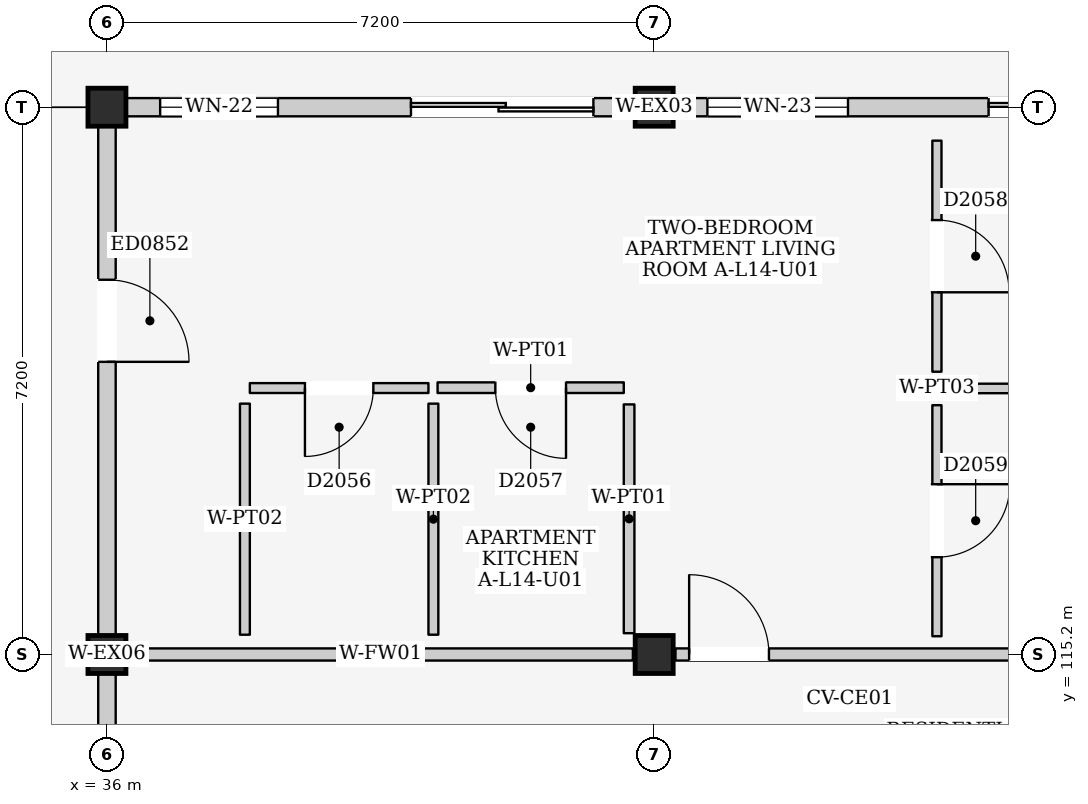
"""IFC4 building model, lengths in metres.
Left out: names, types, materials, properties, quantities, classifications, styles, units other than length and angle.
Written with IfcOpenShell. Run it as: python <this file> out.ifc"""

import sys

from ifc_helpers import new_model, si_unit, direction, frame, frame_2d, origin, origin_2d, place, context, subcontext, project, spatial, rectangle, extrude, element, fill, save


model = new_model("IFC4")
c1 = context("Model", 3, precision=1e-05, world=origin(), true_north=direction((0.0, 1.0)))
c2 = subcontext(c1, "Body", "Model", "MODEL_VIEW")
j1 = project(units=[si_unit("LENGTHUNIT", "METRE"), si_unit("PLANEANGLEUNIT", "RADIAN")], contexts=[c1])
p1 = place(None, origin())
s1 = spatial("IfcSite", under=j1, at=p1, CompositionType="ELEMENT")
p2 = place(p1, origin())
s2 = spatial("IfcBuilding", under=s1, at=p2, CompositionType="ELEMENT")
p3 = place(p2, frame((0.0, 0.0, 47.7)))
s3 = spatial("IfcBuildingStorey", under=s2, at=p3, CompositionType="ELEMENT", Elevation=47.7)
for number, where, z_axis, x_axis in (
    (1, (36.0, 115.2, 0.0), (0.0, 0.0, 1.0), (1.0, 0.0, 0.0)),
    (2, (36.0, 122.4, 0.0), (0.0, 0.0, 1.0), (1.0, 0.0, 0.0)),
    (3, (43.2, 115.2, 0.0), (0.0, 0.0, 1.0), (1.0, 0.0, 0.0)),
    (4, (43.2, 122.4, 0.0), (0.0, 0.0, 1.0), (1.0, 0.0, 0.0)),
):
    element("IfcColumn", number, at=place(p3, frame(where, z_axis=z_axis, x_axis=x_axis)), inside=s3, PredefinedType="COLUMN", context=c2, shape_type="SweptSolid", body=[
        extrude(rectangle(XDim=0.5, YDim=0.5, at=origin_2d()), origin(), (0.0, 0.0, 1.0), 3.2),
    ])
p4 = place(p3, frame((36.25, 122.4, 0.0), z_axis=(0.0, 0.0, 1.0), x_axis=(1.0, 0.0, 0.0)))
e5 = element("IfcWall", 5, at=p4, inside=s3, PredefinedType="ELEMENTEDWALL", context=c2, shape_type="SweptSolid", body=[
    extrude(rectangle(XDim=6.7, YDim=0.24, at=frame_2d((3.35, 0.0))), origin(), (0.0, 0.0, 1.0), 2.535),
])
p5 = place(p4, frame((3.75, 0.0, 0.0)))
e6 = element("IfcOpeningElement", 6, at=p5, cuts=e5, PredefinedType="OPENING", context=c2, shape_type="SweptSolid", body=[
    extrude(rectangle(XDim=2.4, YDim=2.12, at=frame_2d((1.2, 1.06))), frame((0.0, 0.135, 0.0), z_axis=(0.0, -1.0, 0.0), x_axis=(1.0, 0.0, 0.0)), (0.0, 0.0, 1.0), 0.27),
])
p6 = place(p4, frame((0.45, 0.0, 0.9)))
e7 = element("IfcOpeningElement", 7, at=p6, cuts=e5, PredefinedType="OPENING", context=c2, shape_type="SweptSolid", body=[
    extrude(rectangle(XDim=1.55, YDim=1.45, at=frame_2d((0.775, 0.725))), frame((0.0, 0.135, 0.0), z_axis=(0.0, -1.0, 0.0), x_axis=(1.0, 0.0, 0.0)), (0.0, 0.0, 1.0), 0.27),
])
p7 = place(p3, frame((43.45, 122.4, 0.0), z_axis=(0.0, 0.0, 1.0), x_axis=(1.0, 0.0, 0.0)))
e8 = element("IfcWall", 8, at=p7, inside=s3, PredefinedType="ELEMENTEDWALL", context=c2, shape_type="SweptSolid", body=[
    extrude(rectangle(XDim=6.7, YDim=0.24, at=frame_2d((3.35, 0.0))), origin(), (0.0, 0.0, 1.0), 2.535),
])
p8 = place(p7, frame((4.15, 0.0, 0.0)))
e9 = element("IfcOpeningElement", 9, at=p8, cuts=e8, PredefinedType="OPENING", context=c2, shape_type="SweptSolid", body=[
    extrude(rectangle(XDim=2.0, YDim=2.12, at=frame_2d((1.0, 1.06))), frame((0.0, 0.135, 0.0), z_axis=(0.0, -1.0, 0.0), x_axis=(1.0, 0.0, 0.0)), (0.0, 0.0, 1.0), 0.27),
])
p9 = place(p7, frame((0.45, 0.0, 0.9)))
e10 = element("IfcOpeningElement", 10, at=p9, cuts=e8, PredefinedType="OPENING", context=c2, shape_type="SweptSolid", body=[
    extrude(rectangle(XDim=1.85, YDim=1.4, at=frame_2d((0.925, 0.7))), frame((0.0, 0.135, 0.0), z_axis=(0.0, -1.0, 0.0), x_axis=(1.0, 0.0, 0.0)), (0.0, 0.0, 1.0), 0.27),
])
p10 = place(p3, frame((36.0, 108.25, 0.0), z_axis=(0.0, 0.0, 1.0), x_axis=(0.0, 1.0, 0.0)))
e11 = element("IfcWall", 11, at=p10, inside=s3, PredefinedType="ELEMENTEDWALL", context=c2, shape_type="SweptSolid", body=[
    extrude(rectangle(XDim=6.7, YDim=0.23, at=frame_2d((3.35, 0.0))), origin(), (0.0, 0.0, 1.0), 2.485),
])
p11 = place(p10, frame((2.75, 0.0, 1.1)))
e12 = element("IfcOpeningElement", 12, at=p11, cuts=e11, PredefinedType="OPENING", context=c2, shape_type="SweptSolid", body=[
    extrude(rectangle(XDim=1.0, YDim=0.9, at=frame_2d((0.5, 0.45))), frame((0.0, 0.13, 0.0), z_axis=(0.0, -1.0, 0.0), x_axis=(1.0, 0.0, 0.0)), (0.0, 0.0, 1.0), 0.26),
])
p12 = place(p3, frame((36.0, 115.45, 0.0), z_axis=(0.0, 0.0, 1.0), x_axis=(0.0, 1.0, 0.0)))
e13 = element("IfcWall", 13, at=p12, inside=s3, PredefinedType="ELEMENTEDWALL", context=c2, shape_type="SweptSolid", body=[
    extrude(rectangle(XDim=6.7, YDim=0.23, at=frame_2d((3.35, 0.0))), origin(), (0.0, 0.0, 1.0), 2.485),
])
p13 = place(p12, frame((3.6, 0.0, 0.0)))
e14 = element("IfcOpeningElement", 14, at=p13, cuts=e13, PredefinedType="OPENING", context=c2, shape_type="SweptSolid", body=[
    extrude(rectangle(XDim=1.08, YDim=2.12, at=frame_2d((0.54, 1.06))), frame((0.0, 0.13, 0.0), z_axis=(0.0, -1.0, 0.0), x_axis=(1.0, 0.0, 0.0)), (0.0, 0.0, 1.0), 0.26),
])
p14 = place(p3, frame((36.28, 115.2, 0.0), z_axis=(0.0, 0.0, 1.0), x_axis=(1.0, 0.0, 0.0)))
e15 = element("IfcWall", 15, at=p14, inside=s3, PredefinedType="PARTITIONING", context=c2, shape_type="SweptSolid", body=[
    extrude(rectangle(XDim=6.64, YDim=0.16, at=frame_2d((3.32, 0.0))), origin(), (0.0, 0.0, 1.0), 2.335),
])
p15 = place(p3, frame((43.48, 115.2, 0.0), z_axis=(0.0, 0.0, 1.0), x_axis=(1.0, 0.0, 0.0)))
e16 = element("IfcWall", 16, at=p15, inside=s3, PredefinedType="PARTITIONING", context=c2, shape_type="SweptSolid", body=[
    extrude(rectangle(XDim=6.64, YDim=0.16, at=frame_2d((3.32, 0.0))), origin(), (0.0, 0.0, 1.0), 2.335),
])
p16 = place(p15, frame((0.18, 0.0, 0.0)))
e17 = element("IfcOpeningElement", 17, at=p16, cuts=e16, PredefinedType="OPENING", context=c2, shape_type="SweptSolid", body=[
    extrude(rectangle(XDim=1.05, YDim=2.15, at=frame_2d((0.525, 1.075))), frame((0.0, 0.095, 0.0), z_axis=(0.0, -1.0, 0.0), x_axis=(1.0, 0.0, 0.0)), (0.0, 0.0, 1.0), 0.19),
])
p17 = place(p3, frame((37.88, 118.705, 0.0), z_axis=(0.0, 0.0, 1.0), x_axis=(1.0, 0.0, 0.0)))
e18 = element("IfcWall", 18, at=p17, inside=s3, PredefinedType="PARTITIONING", context=c2, shape_type="SweptSolid", body=[
    extrude(rectangle(XDim=2.35, YDim=0.13, at=frame_2d((1.175, 0.0))), origin(), (0.0, 0.0, 1.0), 3.0),
])
p18 = place(p17, frame((0.725, 0.0, 0.0)))
e19 = element("IfcOpeningElement", 19, at=p18, cuts=e18, PredefinedType="OPENING", context=c2, shape_type="SweptSolid", body=[
    extrude(rectangle(XDim=0.9, YDim=2.1, at=frame_2d((0.45, 1.05))), frame((0.0, 0.08, 0.0), z_axis=(0.0, -1.0, 0.0), x_axis=(1.0, 0.0, 0.0)), (0.0, 0.0, 1.0), 0.16),
])
for number, where, z_axis, x_axis in (
    (20, (40.295, 115.46, 0.0), (0.0, 0.0, 1.0), (0.0, 1.0, 0.0)),
    (21, (37.815, 115.46, 0.0), (0.0, 0.0, 1.0), (0.0, 1.0, 0.0)),
):
    element("IfcWall", number, at=place(p3, frame(where, z_axis=z_axis, x_axis=x_axis)), inside=s3, PredefinedType="PARTITIONING", context=c2, shape_type="SweptSolid", body=[
        extrude(rectangle(XDim=3.04, YDim=0.13, at=frame_2d((1.52, 0.0))), origin(), (0.0, 0.0, 1.0), 3.0),
    ])
p19 = place(p3, frame((40.35, 118.71, 0.0), z_axis=(0.0, 0.0, 1.0), x_axis=(1.0, 0.0, 0.0)))
e22 = element("IfcWall", 22, at=p19, inside=s3, PredefinedType="PARTITIONING", context=c2, shape_type="SweptSolid", body=[
    extrude(rectangle(XDim=2.45, YDim=0.14, at=frame_2d((1.225, 0.0))), origin(), (0.0, 0.0, 1.0), 3.0),
])
p20 = place(p19, frame((0.76, 0.0, 0.0)))
e23 = element("IfcOpeningElement", 23, at=p20, cuts=e22, PredefinedType="OPENING", context=c2, shape_type="SweptSolid", body=[
    extrude(rectangle(XDim=0.93, YDim=2.14, at=frame_2d((0.465, 1.07))), frame((0.0, 0.085, 0.0), z_axis=(0.0, -1.0, 0.0), x_axis=(1.0, 0.0, 0.0)), (0.0, 0.0, 1.0), 0.17),
])
p21 = place(p3, frame((42.87, 115.48, 0.0), z_axis=(0.0, 0.0, 1.0), x_axis=(0.0, 1.0, 0.0)))
e24 = element("IfcWall", 24, at=p21, inside=s3, PredefinedType="PARTITIONING", context=c2, shape_type="SweptSolid", body=[
    extrude(rectangle(XDim=3.01, YDim=0.14, at=frame_2d((1.505, 0.0))), origin(), (0.0, 0.0, 1.0), 3.0),
])
p22 = place(p3, frame((46.92, 118.92, 0.0), z_axis=(0.0, 0.0, 1.0), x_axis=(0.0, 1.0, 0.0)))
e25 = element("IfcWall", 25, at=p22, inside=s3, PredefinedType="PARTITIONING", context=c2, shape_type="SweptSolid", body=[
    extrude(rectangle(XDim=3.04, YDim=0.12, at=frame_2d((1.52, 0.0))), origin(), (0.0, 0.0, 1.0), 3.0),
])
p23 = place(p22, frame((1.045, 0.0, 0.0)))
e26 = element("IfcOpeningElement", 26, at=p23, cuts=e25, PredefinedType="OPENING", context=c2, shape_type="SweptSolid", body=[
    extrude(rectangle(XDim=0.95, YDim=2.15, at=frame_2d((0.475, 1.075))), frame((0.0, 0.075, 0.0), z_axis=(0.0, -1.0, 0.0), x_axis=(1.0, 0.0, 0.0)), (0.0, 0.0, 1.0), 0.15),
])
p24 = place(p3, frame((47.12, 118.7, 0.0), z_axis=(0.0, 0.0, 1.0), x_axis=(1.0, 0.0, 0.0)))
e27 = element("IfcWall", 27, at=p24, inside=s3, PredefinedType="PARTITIONING", context=c2, shape_type="SweptSolid", body=[
    extrude(rectangle(XDim=3.06, YDim=0.125, at=frame_2d((1.53, 0.0))), origin(), (0.0, 0.0, 1.0), 3.0),
])
p25 = place(p3, frame((46.92, 115.44, 0.0), z_axis=(0.0, 0.0, 1.0), x_axis=(0.0, 1.0, 0.0)))
e28 = element("IfcWall", 28, at=p25, inside=s3, PredefinedType="PARTITIONING", context=c2, shape_type="SweptSolid", body=[
    extrude(rectangle(XDim=3.04, YDim=0.12, at=frame_2d((1.52, 0.0))), origin(), (0.0, 0.0, 1.0), 3.0),
])
p26 = place(p25, frame((1.04, 0.0, 0.0)))
e29 = element("IfcOpeningElement", 29, at=p26, cuts=e28, PredefinedType="OPENING", context=c2, shape_type="SweptSolid", body=[
    extrude(rectangle(XDim=0.96, YDim=2.15, at=frame_2d((0.48, 1.075))), frame((0.0, 0.075, 0.0), z_axis=(0.0, -1.0, 0.0), x_axis=(1.0, 0.0, 0.0)), (0.0, 0.0, 1.0), 0.15),
])
p27 = place(p5, frame((2.4, 0.0, 0.0), z_axis=(0.0, 0.0, 1.0), x_axis=(-1.0, 0.0, 0.0)))
e30 = element("IfcDoor", 30, at=p27, inside=s3, OperationType="DOUBLE_DOOR_SLIDING", PredefinedType="DOOR", context=c2, shape_type="SweptSolid", body=[
    extrude(rectangle(XDim=2.4, YDim=2.12, at=frame_2d((1.2, 1.06))), frame((0.0, 0.025, 0.0), z_axis=(0.0, -1.0, 0.0), x_axis=(1.0, 0.0, 0.0)), (0.0, 0.0, 1.0), 0.05),
])
fill(e6, e30)
p28 = place(p6, origin())
e31 = element("IfcWindow", 31, at=p28, inside=s3, PartitioningType="DOUBLE_PANEL_VERTICAL", PredefinedType="WINDOW", context=c2, shape_type="SweptSolid", body=[
    extrude(rectangle(XDim=1.55, YDim=1.45, at=frame_2d((0.775, 0.725))), frame((0.0, 0.03, 0.0), z_axis=(0.0, -1.0, 0.0), x_axis=(1.0, 0.0, 0.0)), (0.0, 0.0, 1.0), 0.06),
])
fill(e7, e31)
p29 = place(p8, frame((2.0, 0.0, 0.0), z_axis=(0.0, 0.0, 1.0), x_axis=(-1.0, 0.0, 0.0)))
e32 = element("IfcDoor", 32, at=p29, inside=s3, OperationType="DOUBLE_DOOR_SLIDING", PredefinedType="DOOR", context=c2, shape_type="SweptSolid", body=[
    extrude(rectangle(XDim=2.0, YDim=2.12, at=frame_2d((1.0, 1.06))), frame((0.0, 0.025, 0.0), z_axis=(0.0, -1.0, 0.0), x_axis=(1.0, 0.0, 0.0)), (0.0, 0.0, 1.0), 0.05),
])
fill(e9, e32)
p30 = place(p9, origin())
e33 = element("IfcWindow", 33, at=p30, inside=s3, PartitioningType="DOUBLE_PANEL_VERTICAL", PredefinedType="WINDOW", context=c2, shape_type="SweptSolid", body=[
    extrude(rectangle(XDim=1.85, YDim=1.4, at=frame_2d((0.925, 0.7))), frame((0.0, 0.03, 0.0), z_axis=(0.0, -1.0, 0.0), x_axis=(1.0, 0.0, 0.0)), (0.0, 0.0, 1.0), 0.06),
])
fill(e10, e33)
p31 = place(p13, frame((1.08, 0.0, 0.0), z_axis=(0.0, 0.0, 1.0), x_axis=(-1.0, 0.0, 0.0)))
e34 = element("IfcDoor", 34, at=p31, inside=s3, OperationType="SINGLE_SWING_RIGHT", PredefinedType="DOOR", context=c2, shape_type="SweptSolid", body=[
    extrude(rectangle(XDim=1.08, YDim=2.12, at=frame_2d((0.54, 1.06))), frame((0.0, 0.025, 0.0), z_axis=(0.0, -1.0, 0.0), x_axis=(1.0, 0.0, 0.0)), (0.0, 0.0, 1.0), 0.05),
])
fill(e14, e34)
p32 = place(p16, origin())
e35 = element("IfcDoor", 35, at=p32, inside=s3, OperationType="SINGLE_SWING_LEFT", PredefinedType="DOOR", context=c2, shape_type="SweptSolid", body=[
    extrude(rectangle(XDim=1.05, YDim=2.15, at=frame_2d((0.525, 1.075))), frame((0.0, 0.025, 0.0), z_axis=(0.0, -1.0, 0.0), x_axis=(1.0, 0.0, 0.0)), (0.0, 0.0, 1.0), 0.05),
])
fill(e17, e35)
p33 = place(p18, frame((0.9, 0.0, 0.0), z_axis=(0.0, 0.0, 1.0), x_axis=(-1.0, 0.0, 0.0)))
e36 = element("IfcDoor", 36, at=p33, inside=s3, OperationType="SINGLE_SWING_RIGHT", PredefinedType="DOOR", context=c2, shape_type="SweptSolid", body=[
    extrude(rectangle(XDim=0.9, YDim=2.1, at=frame_2d((0.45, 1.05))), frame((0.0, 0.025, 0.0), z_axis=(0.0, -1.0, 0.0), x_axis=(1.0, 0.0, 0.0)), (0.0, 0.0, 1.0), 0.05),
])
fill(e19, e36)
p34 = place(p20, frame((0.93, 0.0, 0.0), z_axis=(0.0, 0.0, 1.0), x_axis=(-1.0, 0.0, 0.0)))
e37 = element("IfcDoor", 37, at=p34, inside=s3, OperationType="SINGLE_SWING_LEFT", PredefinedType="DOOR", context=c2, shape_type="SweptSolid", body=[
    extrude(rectangle(XDim=0.93, YDim=2.14, at=frame_2d((0.465, 1.07))), frame((0.0, 0.025, 0.0), z_axis=(0.0, -1.0, 0.0), x_axis=(1.0, 0.0, 0.0)), (0.0, 0.0, 1.0), 0.05),
])
fill(e23, e37)
p35 = place(p23, frame((0.95, 0.0, 0.0), z_axis=(0.0, 0.0, 1.0), x_axis=(-1.0, 0.0, 0.0)))
e38 = element("IfcDoor", 38, at=p35, inside=s3, OperationType="SINGLE_SWING_RIGHT", PredefinedType="DOOR", context=c2, shape_type="SweptSolid", body=[
    extrude(rectangle(XDim=0.95, YDim=2.15, at=frame_2d((0.475, 1.075))), frame((0.0, 0.025, 0.0), z_axis=(0.0, -1.0, 0.0), x_axis=(1.0, 0.0, 0.0)), (0.0, 0.0, 1.0), 0.05),
])
fill(e26, e38)
p36 = place(p26, frame((0.96, 0.0, 0.0), z_axis=(0.0, 0.0, 1.0), x_axis=(-1.0, 0.0, 0.0)))
e39 = element("IfcDoor", 39, at=p36, inside=s3, OperationType="SINGLE_SWING_LEFT", PredefinedType="DOOR", context=c2, shape_type="SweptSolid", body=[
    extrude(rectangle(XDim=0.96, YDim=2.15, at=frame_2d((0.48, 1.075))), frame((0.0, 0.025, 0.0), z_axis=(0.0, -1.0, 0.0), x_axis=(1.0, 0.0, 0.0)), (0.0, 0.0, 1.0), 0.05),
])
fill(e29, e39)
save(model, sys.argv[1])
